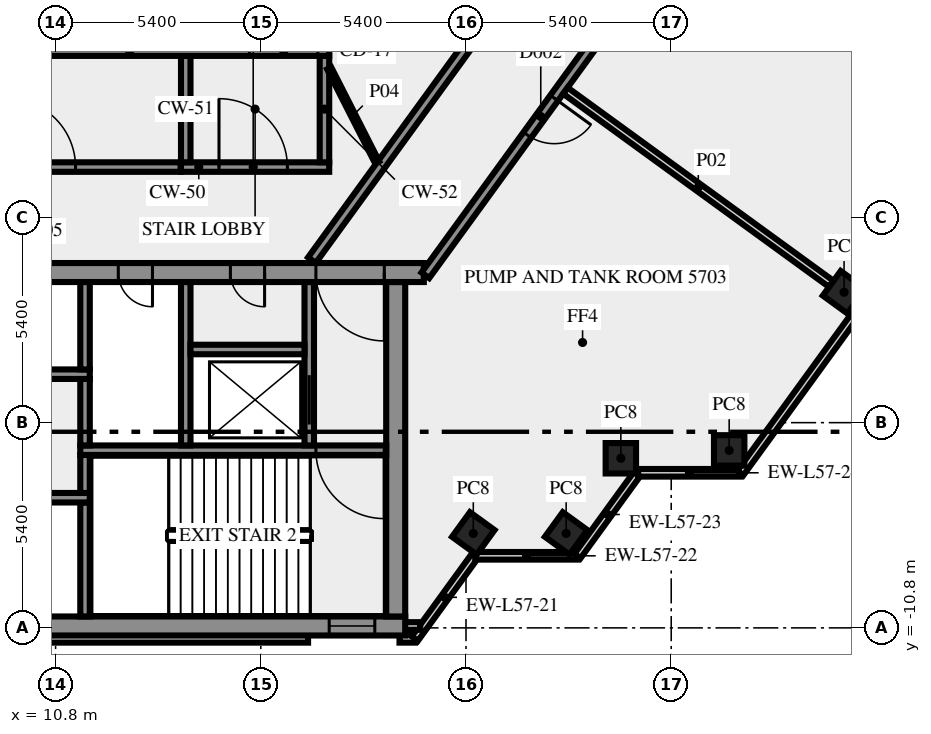
"""IFC4 building model, lengths in metres.
Left out: names, types, materials, properties, quantities, classifications, styles, units other than length and angle.
Written with IfcOpenShell. Run it as: python <this file> out.ifc"""

import sys

from ifc_helpers import new_model, si_unit, direction, frame, frame_2d, origin, origin_2d, place, context, subcontext, project, spatial, rectangle, extrude, element, fill, save


model = new_model("IFC4")
c1 = context("Model", 3, precision=1e-05, world=origin(), true_north=direction((0.0, 1.0)))
c2 = subcontext(c1, "Body", "Model", "MODEL_VIEW")
j1 = project(units=[si_unit("LENGTHUNIT", "METRE"), si_unit("PLANEANGLEUNIT", "RADIAN")], contexts=[c1])
p1 = place(None, origin())
s1 = spatial("IfcSite", under=j1, at=p1, CompositionType="ELEMENT")
p2 = place(p1, origin())
s2 = spatial("IfcBuilding", under=s1, at=p2, CompositionType="ELEMENT")
p3 = place(p2, frame((0.0, 0.0, 242.0)))
s3 = spatial("IfcBuildingStorey", under=s2, at=p3, CompositionType="ELEMENT", Elevation=242.0)
for number, where, z_axis, x_axis in (
    (1, (21.792, -8.315, 0.0), (0.0, 0.0, 1.0), (0.588, 0.809, 0.0)),
    (2, (24.235, -8.315, 0.0), (0.0, 0.0, 1.0), (0.588, 0.809, 0.0)),
    (3, (25.674, -6.337, 0.0), (0.0, 0.0, 1.0), (1.0, 0.0, 0.0)),
    (4, (28.525, -6.13, 0.0), (0.0, 0.0, 1.0), (1.0, 0.0, 0.0)),
    (5, (31.548, -1.969, 0.0), (0.0, 0.0, 1.0), (0.588, 0.809, 0.0)),
):
    element("IfcColumn", number, at=place(p3, frame(where, z_axis=z_axis, x_axis=x_axis)), inside=s3, PredefinedType="COLUMN", context=c2, shape_type="SweptSolid", body=[
        extrude(rectangle(XDim=0.8, YDim=0.8, at=origin_2d()), origin(), (0.0, 0.0, 1.0), 5.6),
    ])
p4 = place(p3, frame((-17.444, -11.088, 0.0), z_axis=(0.0, 0.0, 1.0), x_axis=(1.0, 0.0, 0.0)))
e6 = element("IfcWall", 6, at=p4, inside=s3, PredefinedType="SOLIDWALL", context=c2, shape_type="SweptSolid", body=[
    extrude(rectangle(XDim=34.888, YDim=0.2, at=frame_2d((17.444, 0.0))), origin(), (0.0, 0.0, 1.0), 5.6),
])
p5 = place(p3, frame((19.85, -11.088, 0.0), z_axis=(0.0, 0.0, 1.0), x_axis=(1.0, 0.0, 0.0)))
e7 = element("IfcWall", 7, at=p5, inside=s3, PredefinedType="SOLIDWALL", context=c2, shape_type="SweptSolid", body=[
    extrude(rectangle(XDim=0.406, YDim=0.2, at=frame_2d((0.203, 0.0))), origin(), (0.0, 0.0, 1.0), 5.6),
])
p6 = place(p3, frame((20.253, -11.083, 0.0), z_axis=(0.0, 0.0, 1.0), x_axis=(0.587766567315, 0.809030569476, 0.0)))
e8 = element("IfcWall", 8, at=p6, inside=s3, PredefinedType="SOLIDWALL", context=c2, shape_type="SweptSolid", body=[
    extrude(rectangle(XDim=2.688, YDim=0.2, at=frame_2d((1.344, 0.0))), origin(), (0.0, 0.0, 1.0), 5.6),
])
p7 = place(p3, frame((21.843, -8.904, 0.0), z_axis=(0.0, 0.0, 1.0), x_axis=(1.0, 0.0, 0.0)))
e9 = element("IfcWall", 9, at=p7, inside=s3, PredefinedType="SOLIDWALL", context=c2, shape_type="SweptSolid", body=[
    extrude(rectangle(XDim=2.7, YDim=0.2, at=frame_2d((1.35, 0.0))), origin(), (0.0, 0.0, 1.0), 5.6),
])
p8 = place(p3, frame((24.533, -8.909, 0.0), z_axis=(0.0, 0.0, 1.0), x_axis=(0.587720002413, 0.809064397168, 0.0)))
e10 = element("IfcWall", 10, at=p8, inside=s3, PredefinedType="SOLIDWALL", context=c2, shape_type="SweptSolid", body=[
    extrude(rectangle(XDim=2.7, YDim=0.2, at=frame_2d((1.35, 0.0))), origin(), (0.0, 0.0, 1.0), 5.6),
])
p9 = place(p3, frame((26.13, -6.719, 0.0), z_axis=(0.0, 0.0, 1.0), x_axis=(1.0, 0.0, 0.0)))
e11 = element("IfcWall", 11, at=p9, inside=s3, PredefinedType="SOLIDWALL", context=c2, shape_type="SweptSolid", body=[
    extrude(rectangle(XDim=2.7, YDim=0.2, at=frame_2d((1.35, 0.0))), origin(), (0.0, 0.0, 1.0), 5.6),
])
p10 = place(p3, frame((28.82, -6.724, 0.0), z_axis=(0.0, 0.0, 1.0), x_axis=(0.587789790223, 0.809013697356, 0.0)))
e12 = element("IfcWall", 12, at=p10, inside=s3, PredefinedType="SOLIDWALL", context=c2, shape_type="SweptSolid", body=[
    extrude(rectangle(XDim=16.956, YDim=0.2, at=frame_2d((8.478, 0.0))), origin(), (0.0, 0.0, 1.0), 5.6),
])
p11 = place(p3, frame((19.98, -10.75, 0.0), z_axis=(0.0, 0.0, 1.0), x_axis=(1.0, 0.0, 0.0)))
e13 = element("IfcWall", 13, at=p11, inside=s3, PredefinedType="SOLIDWALL", context=c2, shape_type="SweptSolid", body=[
    extrude(rectangle(XDim=0.417, YDim=0.2, at=frame_2d((0.208, 0.0))), origin(), (0.0, 0.0, 1.0), 5.6),
])
p12 = place(p3, frame((-20.0, -10.75, 0.0), z_axis=(0.0, 0.0, 1.0), x_axis=(1.0, 0.0, 0.0)))
e14 = element("IfcWall", 14, at=p12, inside=s3, PredefinedType="SHEAR", context=c2, shape_type="SweptSolid", body=[
    extrude(rectangle(XDim=40.0, YDim=0.5, at=frame_2d((20.0, 0.0))), origin(), (0.0, 0.0, 1.0), 5.6),
])
p13 = place(p12, frame((0.8, 0.0, 1.0)))
e15 = element("IfcOpeningElement", 15, at=p13, cuts=e14, PredefinedType="OPENING", context=c2, shape_type="SweptSolid", body=[
    extrude(rectangle(XDim=1.2, YDim=1.2, at=frame_2d((0.6, 0.6))), frame((0.0, 0.26, 0.0), z_axis=(0.0, -1.0, 0.0), x_axis=(1.0, 0.0, 0.0)), (0.0, 0.0, 1.0), 0.52),
])
p14 = place(p12, frame((38.0, 0.0, 1.0)))
e16 = element("IfcOpeningElement", 16, at=p14, cuts=e14, PredefinedType="OPENING", context=c2, shape_type="SweptSolid", body=[
    extrude(rectangle(XDim=1.2, YDim=1.2, at=frame_2d((0.6, 0.6))), frame((0.0, 0.26, 0.0), z_axis=(0.0, -1.0, 0.0), x_axis=(1.0, 0.0, 0.0)), (0.0, 0.0, 1.0), 0.52),
])
p15 = place(p3, frame((11.575, -10.5, 0.0), z_axis=(0.0, 0.0, 1.0), x_axis=(0.0, 1.0, 0.0)))
e17 = element("IfcWall", 17, at=p15, inside=s3, PredefinedType="SHEAR", context=c2, shape_type="SweptSolid", body=[
    extrude(rectangle(XDim=3.0, YDim=0.25, at=frame_2d((1.5, 0.0))), origin(), (0.0, 0.0, 1.0), 5.6),
])
p16 = place(p3, frame((19.75, -10.5, 0.0), z_axis=(0.0, 0.0, 1.0), x_axis=(0.0, 1.0, 0.0)))
e18 = element("IfcWall", 18, at=p16, inside=s3, PredefinedType="SHEAR", context=c2, shape_type="SweptSolid", body=[
    extrude(rectangle(XDim=8.8, YDim=0.5, at=frame_2d((4.4, 0.0))), origin(), (0.0, 0.0, 1.0), 5.6),
])
p17 = place(p3, frame((11.7, -7.375, 0.0), z_axis=(0.0, 0.0, 1.0), x_axis=(-1.0, 0.0, 0.0)))
e19 = element("IfcWall", 19, at=p17, inside=s3, PredefinedType="SHEAR", context=c2, shape_type="SweptSolid", body=[
    extrude(rectangle(XDim=23.4, YDim=0.25, at=frame_2d((11.7, 0.0))), origin(), (0.0, 0.0, 1.0), 5.6),
])
p18 = place(p17, frame((14.4, 0.0, 0.0)))
e20 = element("IfcOpeningElement", 20, at=p18, cuts=e19, PredefinedType="OPENING", context=c2, shape_type="SweptSolid", body=[
    extrude(rectangle(XDim=0.9, YDim=2.1, at=frame_2d((0.45, 1.05))), frame((0.0, 0.135, 0.0), z_axis=(0.0, -1.0, 0.0), x_axis=(1.0, 0.0, 0.0)), (0.0, 0.0, 1.0), 0.27),
])
p19 = place(p17, frame((12.5, 0.0, 0.0)))
e21 = element("IfcOpeningElement", 21, at=p19, cuts=e19, PredefinedType="OPENING", context=c2, shape_type="SweptSolid", body=[
    extrude(rectangle(XDim=0.9, YDim=2.1, at=frame_2d((0.45, 1.05))), frame((0.0, 0.135, 0.0), z_axis=(0.0, -1.0, 0.0), x_axis=(1.0, 0.0, 0.0)), (0.0, 0.0, 1.0), 0.27),
])
p20 = place(p17, frame((10.6, 0.0, 0.0)))
e22 = element("IfcOpeningElement", 22, at=p20, cuts=e19, PredefinedType="OPENING", context=c2, shape_type="SweptSolid", body=[
    extrude(rectangle(XDim=0.9, YDim=2.1, at=frame_2d((0.45, 1.05))), frame((0.0, 0.135, 0.0), z_axis=(0.0, -1.0, 0.0), x_axis=(1.0, 0.0, 0.0)), (0.0, 0.0, 1.0), 0.27),
])
p21 = place(p3, frame((11.575, -7.25, 0.0), z_axis=(0.0, 0.0, 1.0), x_axis=(0.0, 1.0, 0.0)))
e23 = element("IfcWall", 23, at=p21, inside=s3, PredefinedType="SHEAR", context=c2, shape_type="SweptSolid", body=[
    extrude(rectangle(XDim=1.0, YDim=0.25, at=frame_2d((0.5, 0.0))), origin(), (0.0, 0.0, 1.0), 5.6),
])
p22 = place(p3, frame((19.5, -6.125, 0.0), z_axis=(0.0, 0.0, 1.0), x_axis=(-1.0, 0.0, 0.0)))
e24 = element("IfcWall", 24, at=p22, inside=s3, PredefinedType="SHEAR", context=c2, shape_type="SweptSolid", body=[
    extrude(rectangle(XDim=8.05, YDim=0.25, at=frame_2d((4.025, 0.0))), origin(), (0.0, 0.0, 1.0), 5.6),
])
p23 = place(p22, frame((0.05, 0.0, 0.0)))
e25 = element("IfcOpeningElement", 25, at=p23, cuts=e24, PredefinedType="OPENING", context=c2, shape_type="SweptSolid", body=[
    extrude(rectangle(XDim=1.8, YDim=2.1, at=frame_2d((0.9, 1.05))), frame((0.0, 0.135, 0.0), z_axis=(0.0, -1.0, 0.0), x_axis=(1.0, 0.0, 0.0)), (0.0, 0.0, 1.0), 0.27),
])
p24 = place(p3, frame((11.575, -6.0, 0.0), z_axis=(0.0, 0.0, 1.0), x_axis=(0.0, 1.0, 0.0)))
e26 = element("IfcWall", 26, at=p24, inside=s3, PredefinedType="SHEAR", context=c2, shape_type="SweptSolid", body=[
    extrude(rectangle(XDim=1.75, YDim=0.25, at=frame_2d((0.875, 0.0))), origin(), (0.0, 0.0, 1.0), 5.6),
])
p25 = place(p3, frame((14.225, -6.0, 0.0), z_axis=(0.0, 0.0, 1.0), x_axis=(0.0, 1.0, 0.0)))
e27 = element("IfcWall", 27, at=p25, inside=s3, PredefinedType="SHEAR", context=c2, shape_type="SweptSolid", body=[
    extrude(rectangle(XDim=4.3, YDim=0.25, at=frame_2d((2.15, 0.0))), origin(), (0.0, 0.0, 1.0), 5.6),
])
p26 = place(p3, frame((17.475, -6.0, 0.0), z_axis=(0.0, 0.0, 1.0), x_axis=(0.0, 1.0, 0.0)))
e28 = element("IfcWall", 28, at=p26, inside=s3, PredefinedType="SHEAR", context=c2, shape_type="SweptSolid", body=[
    extrude(rectangle(XDim=4.3, YDim=0.25, at=frame_2d((2.15, 0.0))), origin(), (0.0, 0.0, 1.0), 5.6),
])
p27 = place(p26, frame((0.55, 0.0, 0.0)))
e29 = element("IfcOpeningElement", 29, at=p27, cuts=e28, PredefinedType="OPENING", context=c2, shape_type="SweptSolid", body=[
    extrude(rectangle(XDim=1.3, YDim=2.1, at=frame_2d((0.65, 1.05))), frame((0.0, 0.135, 0.0), z_axis=(0.0, -1.0, 0.0), x_axis=(1.0, 0.0, 0.0)), (0.0, 0.0, 1.0), 0.27),
])
p28 = place(p3, frame((1.45, -4.125, 0.0), z_axis=(0.0, 0.0, 1.0), x_axis=(1.0, 0.0, 0.0)))
e30 = element("IfcWall", 30, at=p28, inside=s3, PredefinedType="SHEAR", context=c2, shape_type="SweptSolid", body=[
    extrude(rectangle(XDim=10.25, YDim=0.25, at=frame_2d((5.125, 0.0))), origin(), (0.0, 0.0, 1.0), 5.6),
])
p29 = place(p28, frame((0.7, 0.0, 0.0)))
e31 = element("IfcOpeningElement", 31, at=p29, cuts=e30, PredefinedType="OPENING", context=c2, shape_type="SweptSolid", body=[
    extrude(rectangle(XDim=1.3, YDim=2.1, at=frame_2d((0.65, 1.05))), frame((0.0, 0.135, 0.0), z_axis=(0.0, -1.0, 0.0), x_axis=(1.0, 0.0, 0.0)), (0.0, 0.0, 1.0), 0.27),
])
p30 = place(p3, frame((11.575, -4.0, 0.0), z_axis=(0.0, 0.0, 1.0), x_axis=(0.0, 1.0, 0.0)))
e32 = element("IfcWall", 32, at=p30, inside=s3, PredefinedType="SHEAR", context=c2, shape_type="SweptSolid", body=[
    extrude(rectangle(XDim=2.3, YDim=0.25, at=frame_2d((1.15, 0.0))), origin(), (0.0, 0.0, 1.0), 5.6),
])
p31 = place(p3, frame((14.35, -3.475, 0.0), z_axis=(0.0, 0.0, 1.0), x_axis=(1.0, 0.0, 0.0)))
e33 = element("IfcWall", 33, at=p31, inside=s3, PredefinedType="SHEAR", context=c2, shape_type="SweptSolid", body=[
    extrude(rectangle(XDim=3.0, YDim=0.25, at=frame_2d((1.5, 0.0))), origin(), (0.0, 0.0, 1.0), 5.6),
])
p32 = place(p3, frame((20.49, -1.45, 0.0), z_axis=(0.0, 0.0, 1.0), x_axis=(-1.0, 0.0, 0.0)))
e34 = element("IfcWall", 34, at=p32, inside=s3, PredefinedType="SHEAR", context=c2, shape_type="SweptSolid", body=[
    extrude(rectangle(XDim=40.98, YDim=0.5, at=frame_2d((20.49, 0.0))), origin(), (0.0, 0.0, 1.0), 5.6),
])
p33 = place(p32, frame((38.14, 0.0, 0.0)))
e35 = element("IfcOpeningElement", 35, at=p33, cuts=e34, PredefinedType="OPENING", context=c2, shape_type="SweptSolid", body=[
    extrude(rectangle(XDim=1.8, YDim=2.1, at=frame_2d((0.9, 1.05))), frame((0.0, 0.26, 0.0), z_axis=(0.0, -1.0, 0.0), x_axis=(1.0, 0.0, 0.0)), (0.0, 0.0, 1.0), 0.52),
])
p34 = place(p32, frame((36.728, 0.0, 0.0)))
e36 = element("IfcOpeningElement", 36, at=p34, cuts=e34, PredefinedType="OPENING", context=c2, shape_type="SweptSolid", body=[
    extrude(rectangle(XDim=0.8, YDim=2.1, at=frame_2d((0.4, 1.05))), frame((0.0, 0.26, 0.0), z_axis=(0.0, -1.0, 0.0), x_axis=(1.0, 0.0, 0.0)), (0.0, 0.0, 1.0), 0.52),
])
p35 = place(p32, frame((35.153, 0.0, 0.0)))
e37 = element("IfcOpeningElement", 37, at=p35, cuts=e34, PredefinedType="OPENING", context=c2, shape_type="SweptSolid", body=[
    extrude(rectangle(XDim=0.8, YDim=2.1, at=frame_2d((0.4, 1.05))), frame((0.0, 0.26, 0.0), z_axis=(0.0, -1.0, 0.0), x_axis=(1.0, 0.0, 0.0)), (0.0, 0.0, 1.0), 0.52),
])
p36 = place(p32, frame((32.94, 0.0, 0.0)))
e38 = element("IfcOpeningElement", 38, at=p36, cuts=e34, PredefinedType="OPENING", context=c2, shape_type="SweptSolid", body=[
    extrude(rectangle(XDim=0.9, YDim=2.1, at=frame_2d((0.45, 1.05))), frame((0.0, 0.26, 0.0), z_axis=(0.0, -1.0, 0.0), x_axis=(1.0, 0.0, 0.0)), (0.0, 0.0, 1.0), 0.52),
])
p37 = place(p32, frame((20.74, 0.0, 0.0)))
e39 = element("IfcOpeningElement", 39, at=p37, cuts=e34, PredefinedType="OPENING", context=c2, shape_type="SweptSolid", body=[
    extrude(rectangle(XDim=2.0, YDim=2.1, at=frame_2d((1.0, 1.05))), frame((0.0, 0.26, 0.0), z_axis=(0.0, -1.0, 0.0), x_axis=(1.0, 0.0, 0.0)), (0.0, 0.0, 1.0), 0.52),
])
p38 = place(p32, frame((7.14, 0.0, 0.0)))
e40 = element("IfcOpeningElement", 40, at=p38, cuts=e34, PredefinedType="OPENING", context=c2, shape_type="SweptSolid", body=[
    extrude(rectangle(XDim=0.9, YDim=2.1, at=frame_2d((0.45, 1.05))), frame((0.0, 0.26, 0.0), z_axis=(0.0, -1.0, 0.0), x_axis=(1.0, 0.0, 0.0)), (0.0, 0.0, 1.0), 0.52),
])
p39 = place(p32, frame((4.19, 0.0, 0.0)))
e41 = element("IfcOpeningElement", 41, at=p39, cuts=e34, PredefinedType="OPENING", context=c2, shape_type="SweptSolid", body=[
    extrude(rectangle(XDim=0.9, YDim=2.1, at=frame_2d((0.45, 1.05))), frame((0.0, 0.26, 0.0), z_axis=(0.0, -1.0, 0.0), x_axis=(1.0, 0.0, 0.0)), (0.0, 0.0, 1.0), 0.52),
])
p40 = place(p32, frame((1.04, 0.0, 0.0)))
e42 = element("IfcOpeningElement", 42, at=p40, cuts=e34, PredefinedType="OPENING", context=c2, shape_type="SweptSolid", body=[
    extrude(rectangle(XDim=1.8, YDim=2.1, at=frame_2d((0.9, 1.05))), frame((0.0, 0.26, 0.0), z_axis=(0.0, -1.0, 0.0), x_axis=(1.0, 0.0, 0.0)), (0.0, 0.0, 1.0), 0.52),
])
p41 = place(p3, frame((14.1, 1.325, 0.0), z_axis=(0.0, 0.0, 1.0), x_axis=(1.0, 0.0, 0.0)))
e43 = element("IfcWall", 43, at=p41, inside=s3, PredefinedType="SHEAR", context=c2, shape_type="SweptSolid", body=[
    extrude(rectangle(XDim=3.9, YDim=0.25, at=frame_2d((1.95, 0.0))), origin(), (0.0, 0.0, 1.0), 5.6),
])
p42 = place(p41, frame((1.0, 0.0, 0.0)))
e44 = element("IfcOpeningElement", 44, at=p42, cuts=e43, PredefinedType="OPENING", context=c2, shape_type="SweptSolid", body=[
    extrude(rectangle(XDim=1.8, YDim=2.1, at=frame_2d((0.9, 1.05))), frame((0.0, 0.135, 0.0), z_axis=(0.0, -1.0, 0.0), x_axis=(1.0, 0.0, 0.0)), (0.0, 0.0, 1.0), 0.27),
])
for number, where, z_axis, x_axis in (
    (45, (14.225, 1.45, 0.0), (0.0, 0.0, 1.0), (0.0, 1.0, 0.0)),
    (46, (17.875, 1.45, 0.0), (0.0, 0.0, 1.0), (0.0, 1.0, 0.0)),
):
    element("IfcWall", number, at=place(p3, frame(where, z_axis=z_axis, x_axis=x_axis)), inside=s3, PredefinedType="SHEAR", context=c2, shape_type="SweptSolid", body=[
        extrude(rectangle(XDim=2.8, YDim=0.25, at=frame_2d((1.4, 0.0))), origin(), (0.0, 0.0, 1.0), 5.6),
    ])
p43 = place(p3, frame((7.5, 4.375, 0.0), z_axis=(0.0, 0.0, 1.0), x_axis=(1.0, 0.0, 0.0)))
e47 = element("IfcWall", 47, at=p43, inside=s3, PredefinedType="SHEAR", context=c2, shape_type="SweptSolid", body=[
    extrude(rectangle(XDim=10.5, YDim=0.25, at=frame_2d((5.25, 0.0))), origin(), (0.0, 0.0, 1.0), 5.6),
])
p44 = place(p43, frame((8.4, 0.0, 0.0)))
e48 = element("IfcOpeningElement", 48, at=p44, cuts=e47, PredefinedType="OPENING", context=c2, shape_type="SweptSolid", body=[
    extrude(rectangle(XDim=1.8, YDim=2.1, at=frame_2d((0.9, 1.05))), frame((0.0, 0.135, 0.0), z_axis=(0.0, -1.0, 0.0), x_axis=(1.0, 0.0, 0.0)), (0.0, 0.0, 1.0), 0.27),
])
p45 = place(p3, frame((6.754, 1.325, 0.0), z_axis=(0.0, 0.0, 1.0), x_axis=(1.0, 0.0, 0.0)))
e49 = element("IfcWall", 49, at=p45, inside=s3, PredefinedType="SOLIDWALL", context=c2, shape_type="SweptSolid", body=[
    extrude(rectangle(XDim=7.336, YDim=0.25, at=frame_2d((3.668, 0.0))), origin(), (0.0, 0.0, 1.0), 5.6),
])
p46 = place(p45, frame((2.771, 0.0, 0.0)))
e50 = element("IfcOpeningElement", 50, at=p46, cuts=e49, PredefinedType="OPENING", context=c2, shape_type="SweptSolid", body=[
    extrude(rectangle(XDim=1.8, YDim=2.1, at=frame_2d((0.9, 1.05))), frame((0.0, 0.135, 0.0), z_axis=(0.0, -1.0, 0.0), x_axis=(1.0, 0.0, 0.0)), (0.0, 0.0, 1.0), 0.27),
])
p47 = place(p3, frame((17.545, -1.125, 0.0), z_axis=(0.0, 0.0, 1.0), x_axis=(0.587789755823, 0.80901372235, 0.0)))
e51 = element("IfcWall", 51, at=p47, inside=s3, PredefinedType="SOLIDWALL", context=c2, shape_type="SweptSolid", body=[
    extrude(rectangle(XDim=23.645, YDim=0.25, at=frame_2d((11.822, 0.0))), origin(), (0.0, 0.0, 1.0), 5.6),
])
p48 = place(p47, frame((21.603, 0.0, 0.0)))
e52 = element("IfcOpeningElement", 52, at=p48, cuts=e51, PredefinedType="OPENING", context=c2, shape_type="SweptSolid", body=[
    extrude(rectangle(XDim=0.9, YDim=2.1, at=frame_2d((0.45, 1.05))), frame((0.0, 0.135, 0.0), z_axis=(0.0, -1.0, 0.0), x_axis=(1.0, 0.0, 0.0)), (0.0, 0.0, 1.0), 0.27),
])
p49 = place(p3, frame((33.531, 16.369, 0.0), z_axis=(0.0, 0.0, 1.0), x_axis=(-0.587781095509, -0.809020014438, 0.0)))
e53 = element("IfcWall", 53, at=p49, inside=s3, PredefinedType="SOLIDWALL", context=c2, shape_type="SweptSolid", body=[
    extrude(rectangle(XDim=22.117, YDim=0.25, at=frame_2d((11.058, 0.0))), origin(), (0.0, 0.0, 1.0), 5.6),
])
p50 = place(p49, frame((16.352, 0.0, 0.0)))
e54 = element("IfcOpeningElement", 54, at=p50, cuts=e53, PredefinedType="OPENING", context=c2, shape_type="SweptSolid", body=[
    extrude(rectangle(XDim=1.2, YDim=2.1, at=frame_2d((0.6, 1.05))), frame((0.0, 0.135, 0.0), z_axis=(0.0, -1.0, 0.0), x_axis=(1.0, 0.0, 0.0)), (0.0, 0.0, 1.0), 0.27),
])
p51 = place(p49, frame((1.046, 0.0, 0.0)))
e55 = element("IfcOpeningElement", 55, at=p51, cuts=e53, PredefinedType="OPENING", context=c2, shape_type="SweptSolid", body=[
    extrude(rectangle(XDim=1.2, YDim=2.1, at=frame_2d((0.6, 1.05))), frame((0.0, 0.135, 0.0), z_axis=(0.0, -1.0, 0.0), x_axis=(1.0, 0.0, 0.0)), (0.0, 0.0, 1.0), 0.27),
])
p52 = place(p3, frame((31.209, -1.747, 0.0), z_axis=(0.0, 0.0, 1.0), x_axis=(-0.80898392027, 0.587830772199, 0.0)))
e56 = element("IfcWall", 56, at=p52, inside=s3, PredefinedType="SOLIDWALL", context=c2, shape_type="SweptSolid", body=[
    extrude(rectangle(XDim=8.645, YDim=0.2, at=frame_2d((4.323, 0.0))), origin(), (0.0, 0.0, 1.0), 5.6),
])
p53 = place(p3, frame((18.0, 3.925, 0.0), z_axis=(0.0, 0.0, 1.0), x_axis=(0.453950796792, -0.891026752736, 0.0)))
e57 = element("IfcWall", 57, at=p53, inside=s3, PredefinedType="PARTITIONING", context=c2, shape_type="SweptSolid", body=[
    extrude(rectangle(XDim=2.778, YDim=0.12, at=frame_2d((1.389, 0.0))), origin(), (0.0, 0.0, 1.0), 5.6),
])
p54 = place(p14, origin())
e58 = element("IfcWindow", 58, at=p54, inside=s3, PartitioningType="SINGLE_PANEL", PredefinedType="WINDOW", context=c2, shape_type="SweptSolid", body=[
    extrude(rectangle(XDim=1.2, YDim=1.2, at=frame_2d((0.6, 0.6))), frame((0.0, 0.03, 0.0), z_axis=(0.0, -1.0, 0.0), x_axis=(1.0, 0.0, 0.0)), (0.0, 0.0, 1.0), 0.06),
])
fill(e16, e58)
p55 = place(p23, origin())
e59 = element("IfcDoor", 59, at=p55, inside=s3, OperationType="DOUBLE_DOOR_SINGLE_SWING", PredefinedType="DOOR", context=c2, shape_type="SweptSolid", body=[
    extrude(rectangle(XDim=1.8, YDim=2.1, at=frame_2d((0.9, 1.05))), frame((0.0, 0.025, 0.0), z_axis=(0.0, -1.0, 0.0), x_axis=(1.0, 0.0, 0.0)), (0.0, 0.0, 1.0), 0.05),
])
fill(e25, e59)
p56 = place(p27, origin())
e60 = element("IfcDoor", 60, at=p56, inside=s3, OperationType="DOUBLE_DOOR_SLIDING", PredefinedType="DOOR", context=c2, shape_type="SweptSolid", body=[
    extrude(rectangle(XDim=1.3, YDim=2.1, at=frame_2d((0.65, 1.05))), frame((0.0, 0.025, 0.0), z_axis=(0.0, -1.0, 0.0), x_axis=(1.0, 0.0, 0.0)), (0.0, 0.0, 1.0), 0.05),
])
fill(e29, e60)
p57 = place(p38, origin())
e61 = element("IfcDoor", 61, at=p57, inside=s3, OperationType="SINGLE_SWING_LEFT", PredefinedType="DOOR", context=c2, shape_type="SweptSolid", body=[
    extrude(rectangle(XDim=0.9, YDim=2.1, at=frame_2d((0.45, 1.05))), frame((0.0, 0.025, 0.0), z_axis=(0.0, -1.0, 0.0), x_axis=(1.0, 0.0, 0.0)), (0.0, 0.0, 1.0), 0.05),
])
fill(e40, e61)
p58 = place(p39, origin())
e62 = element("IfcDoor", 62, at=p58, inside=s3, OperationType="SINGLE_SWING_LEFT", PredefinedType="DOOR", context=c2, shape_type="SweptSolid", body=[
    extrude(rectangle(XDim=0.9, YDim=2.1, at=frame_2d((0.45, 1.05))), frame((0.0, 0.025, 0.0), z_axis=(0.0, -1.0, 0.0), x_axis=(1.0, 0.0, 0.0)), (0.0, 0.0, 1.0), 0.05),
])
fill(e41, e62)
p59 = place(p40, origin())
e63 = element("IfcDoor", 63, at=p59, inside=s3, OperationType="DOUBLE_DOOR_SINGLE_SWING", PredefinedType="DOOR", context=c2, shape_type="SweptSolid", body=[
    extrude(rectangle(XDim=1.8, YDim=2.1, at=frame_2d((0.9, 1.05))), frame((0.0, 0.025, 0.0), z_axis=(0.0, -1.0, 0.0), x_axis=(1.0, 0.0, 0.0)), (0.0, 0.0, 1.0), 0.05),
])
fill(e42, e63)
p60 = place(p42, origin())
e64 = element("IfcDoor", 64, at=p60, inside=s3, OperationType="DOUBLE_DOOR_SINGLE_SWING", PredefinedType="DOOR", context=c2, shape_type="SweptSolid", body=[
    extrude(rectangle(XDim=1.8, YDim=2.1, at=frame_2d((0.9, 1.05))), frame((0.0, 0.025, 0.0), z_axis=(0.0, -1.0, 0.0), x_axis=(1.0, 0.0, 0.0)), (0.0, 0.0, 1.0), 0.05),
])
fill(e44, e64)
p61 = place(p44, origin())
e65 = element("IfcDoor", 65, at=p61, inside=s3, OperationType="DOUBLE_DOOR_SINGLE_SWING", PredefinedType="DOOR", context=c2, shape_type="SweptSolid", body=[
    extrude(rectangle(XDim=1.8, YDim=2.1, at=frame_2d((0.9, 1.05))), frame((0.0, 0.025, 0.0), z_axis=(0.0, -1.0, 0.0), x_axis=(1.0, 0.0, 0.0)), (0.0, 0.0, 1.0), 0.05),
])
fill(e48, e65)
p62 = place(p46, origin())
e66 = element("IfcDoor", 66, at=p62, inside=s3, OperationType="DOUBLE_DOOR_SINGLE_SWING", PredefinedType="DOOR", context=c2, shape_type="SweptSolid", body=[
    extrude(rectangle(XDim=1.8, YDim=2.1, at=frame_2d((0.9, 1.05))), frame((0.0, 0.025, 0.0), z_axis=(0.0, -1.0, 0.0), x_axis=(1.0, 0.0, 0.0)), (0.0, 0.0, 1.0), 0.05),
])
fill(e50, e66)
p63 = place(p50, origin())
e67 = element("IfcDoor", 67, at=p63, inside=s3, OperationType="SINGLE_SWING_LEFT", PredefinedType="DOOR", context=c2, shape_type="SweptSolid", body=[
    extrude(rectangle(XDim=1.2, YDim=2.1, at=frame_2d((0.6, 1.05))), frame((0.0, 0.025, 0.0), z_axis=(0.0, -1.0, 0.0), x_axis=(1.0, 0.0, 0.0)), (0.0, 0.0, 1.0), 0.05),
])
fill(e54, e67)
save(model, sys.argv[1])
